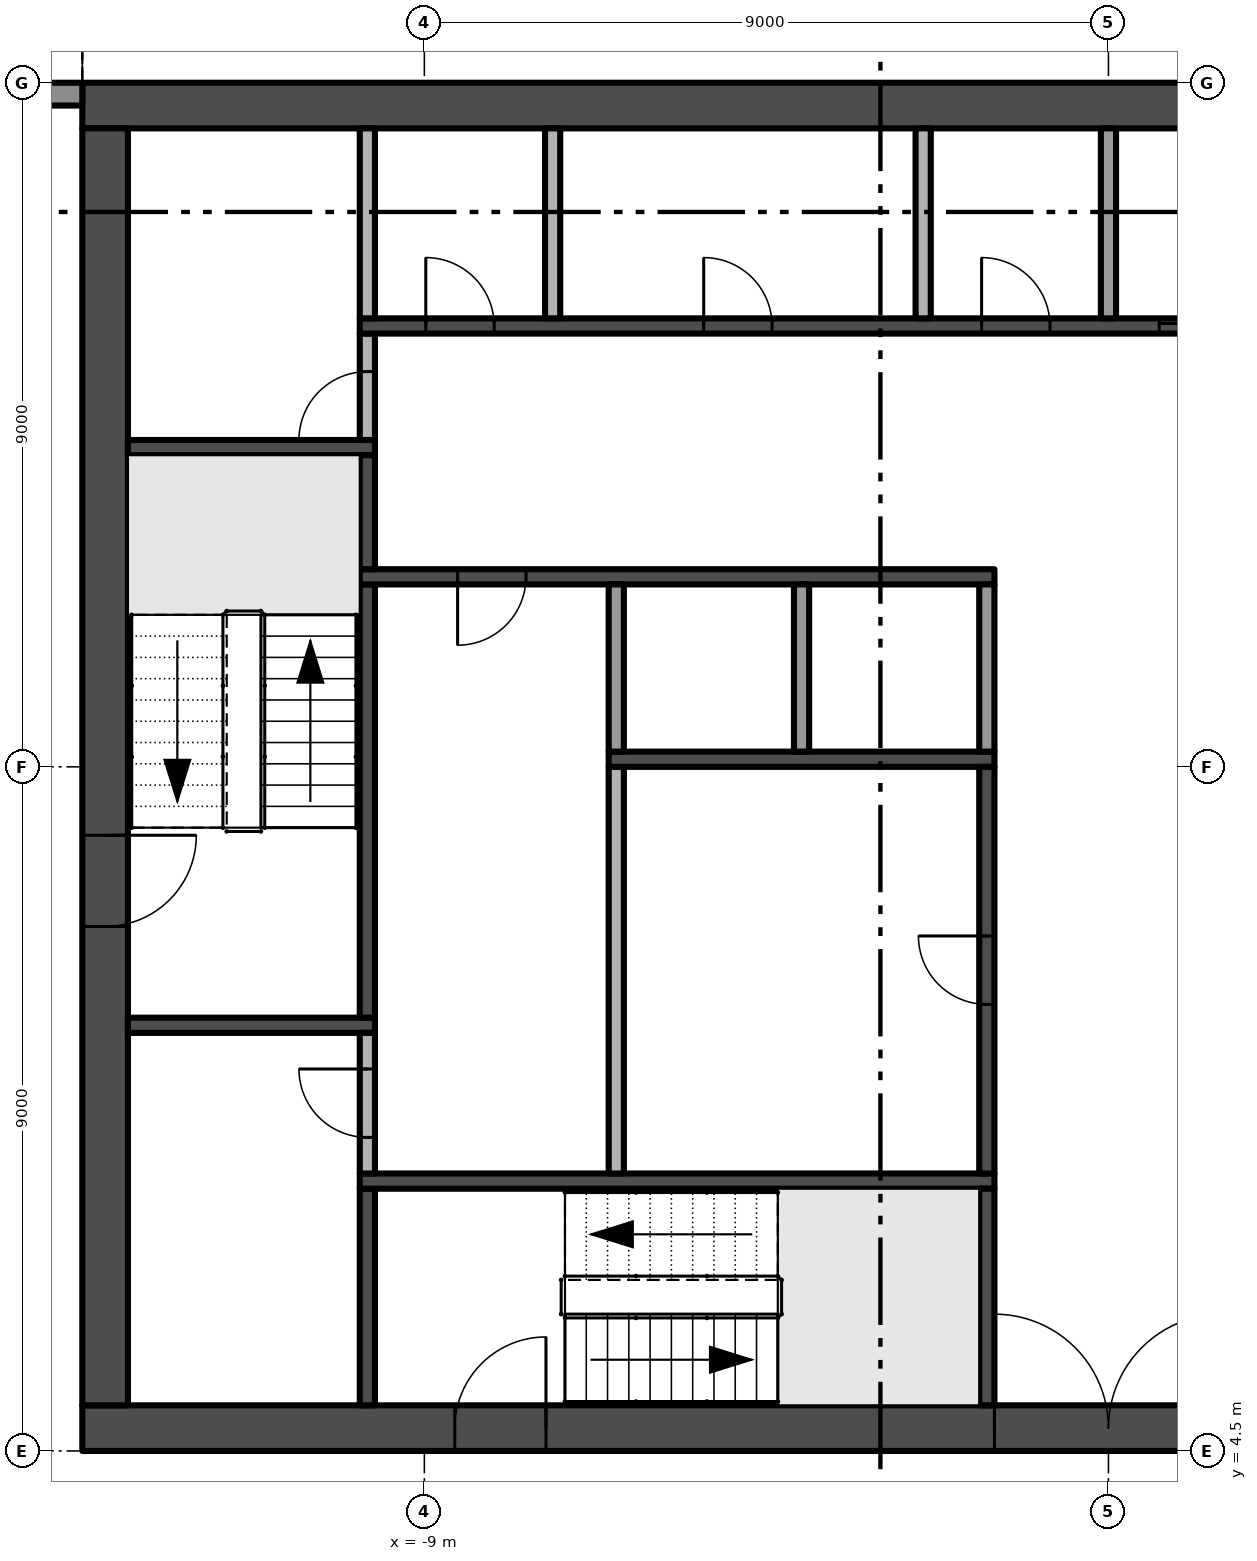
"""IFC4 building model, lengths in metres.
Left out: names, types, materials, properties, quantities, classifications, styles, units other than length and angle.
Written with IfcOpenShell. Run it as: python <this file> out.ifc"""

import sys

from ifc_helpers import new_model, si_unit, direction, frame, frame_2d, origin, place, context, subcontext, project, spatial, polyline, rectangle, outline, extrude, element, fill, save


model = new_model("IFC4")
c1 = context("Model", 3, precision=1e-05, world=origin(), true_north=direction((0.0, 1.0)))
c2 = subcontext(c1, "Body", "Model", "MODEL_VIEW")
j1 = project(units=[si_unit("LENGTHUNIT", "METRE"), si_unit("PLANEANGLEUNIT", "RADIAN")], contexts=[c1])
p1 = place(None, origin())
s1 = spatial("IfcSite", under=j1, at=p1, CompositionType="ELEMENT")
p2 = place(p1, origin())
s2 = spatial("IfcBuilding", under=s1, at=p2, CompositionType="ELEMENT")
p3 = place(p2, frame((0.0, 0.0, 226.2)))
s3 = spatial("IfcBuildingStorey", under=s2, at=p3, CompositionType="ELEMENT", Elevation=226.2)
p4 = place(p3, frame((-13.5, 4.8, -0.3), z_axis=(0.0, 0.0, 1.0), x_axis=(1.0, 0.0, 0.0)))
e1 = element("IfcWall", 1, at=p4, inside=s3, PredefinedType="SHEAR", context=c2, shape_type="SweptSolid", body=[
    extrude(rectangle(XDim=27.0, YDim=0.6, at=frame_2d((13.5, 0.0))), origin(), (0.0, 0.0, 1.0), 3.8),
])
p5 = place(p4, frame((12.0, 0.0, 0.3)))
e2 = element("IfcOpeningElement", 2, at=p5, cuts=e1, PredefinedType="OPENING", context=c2, shape_type="SweptSolid", body=[
    extrude(rectangle(XDim=3.0, YDim=2.4, at=frame_2d((1.5, 1.2))), frame((0.0, 0.31, 0.0), z_axis=(0.0, -1.0, 0.0), x_axis=(1.0, 0.0, 0.0)), (0.0, 0.0, 1.0), 0.62),
])
p6 = place(p4, frame((4.9, 0.0, 0.3)))
e3 = element("IfcOpeningElement", 3, at=p6, cuts=e1, PredefinedType="OPENING", context=c2, shape_type="SweptSolid", body=[
    extrude(rectangle(XDim=1.2, YDim=2.2, at=frame_2d((0.6, 1.1))), frame((0.0, 0.31, 0.0), z_axis=(0.0, -1.0, 0.0), x_axis=(1.0, 0.0, 0.0)), (0.0, 0.0, 1.0), 0.62),
])
p7 = place(p4, frame((20.75, 0.0, 0.3)))
e4 = element("IfcOpeningElement", 4, at=p7, cuts=e1, PredefinedType="OPENING", context=c2, shape_type="SweptSolid", body=[
    extrude(rectangle(XDim=1.5, YDim=2.2, at=frame_2d((0.75, 1.1))), frame((0.0, 0.31, 0.0), z_axis=(0.0, -1.0, 0.0), x_axis=(1.0, 0.0, 0.0)), (0.0, 0.0, 1.0), 0.62),
])
p8 = place(p4, frame((17.4, 0.0, 0.3)))
e5 = element("IfcOpeningElement", 5, at=p8, cuts=e1, PredefinedType="OPENING", context=c2, shape_type="SweptSolid", body=[
    extrude(rectangle(XDim=1.2, YDim=2.2, at=frame_2d((0.6, 1.1))), frame((0.0, 0.31, 0.0), z_axis=(0.0, -1.0, 0.0), x_axis=(1.0, 0.0, 0.0)), (0.0, 0.0, 1.0), 0.62),
])
p9 = place(p3, frame((13.5, 22.2, -0.3), z_axis=(0.0, 0.0, 1.0), x_axis=(-1.0, 0.0, 0.0)))
e6 = element("IfcWall", 6, at=p9, inside=s3, PredefinedType="SHEAR", context=c2, shape_type="SweptSolid", body=[
    extrude(rectangle(XDim=27.0, YDim=0.6, at=frame_2d((13.5, 0.0))), origin(), (0.0, 0.0, 1.0), 3.8),
])
p10 = place(p3, frame((-13.2, 21.9, -0.3), z_axis=(0.0, 0.0, 1.0), x_axis=(0.0, -1.0, 0.0)))
e7 = element("IfcWall", 7, at=p10, inside=s3, PredefinedType="SHEAR", context=c2, shape_type="SweptSolid", body=[
    extrude(rectangle(XDim=16.8, YDim=0.6, at=frame_2d((8.4, 0.0))), origin(), (0.0, 0.0, 1.0), 3.8),
])
p11 = place(p10, frame((9.3, 0.0, 0.3)))
e8 = element("IfcOpeningElement", 8, at=p11, cuts=e7, PredefinedType="OPENING", context=c2, shape_type="SweptSolid", body=[
    extrude(rectangle(XDim=1.2, YDim=2.2, at=frame_2d((0.6, 1.1))), frame((0.0, 0.31, 0.0), z_axis=(0.0, -1.0, 0.0), x_axis=(1.0, 0.0, 0.0)), (0.0, 0.0, 1.0), 0.62),
])
p12 = place(p3, frame((-17.525, 22.35, 0.0), z_axis=(0.0, 0.0, 1.0), x_axis=(1.0, 0.0, 0.0)))
e9 = element("IfcWall", 9, at=p12, inside=s3, PredefinedType="SOLIDWALL", context=c2, shape_type="SweptSolid", body=[
    extrude(rectangle(XDim=4.025, YDim=0.3, at=frame_2d((2.013, 0.0))), origin(), (0.0, 0.0, 1.0), 3.5),
])
p13 = place(p12, frame((0.325, 0.0, 0.45)))
e10 = element("IfcOpeningElement", 10, at=p13, cuts=e9, PredefinedType="OPENING", context=c2, shape_type="SweptSolid", body=[
    extrude(rectangle(XDim=3.075, YDim=2.65, at=frame_2d((1.538, 1.325))), frame((0.0, 0.16, 0.0), z_axis=(0.0, -1.0, 0.0), x_axis=(1.0, 0.0, 0.0)), (0.0, 0.0, 1.0), 0.32),
])
p14 = place(p3, origin())
e11 = element("IfcWall", 11, at=p14, inside=s3, PredefinedType="USERDEFINED", context=c2, shape_type="SweptSolid", body=[
    extrude(outline(polyline([(-13.5, 24.3), (-15.0, 23.595), (-16.5, 23.159), (-17.25, 23.1), (-18.0, 23.159), (-19.5, 23.595), (-21.0, 24.3), (-22.5, 25.005), (-22.606, 24.779), (-21.106, 24.074), (-19.589, 23.36), (-18.045, 22.911), (-17.25, 22.849), (-16.455, 22.911), (-14.911, 23.36), (-13.394, 24.074), (-13.5, 24.3)])), origin(), (0.0, 0.0, 1.0), 0.9),
])
for number, where, z_axis, x_axis in (
    (12, (-12.9, 10.1, 0.0), (0.0, 0.0, 1.0), (1.0, 0.0, 0.0)),
    (13, (-12.9, 17.7, 0.0), (0.0, 0.0, 1.0), (1.0, 0.0, 0.0)),
):
    element("IfcWall", number, at=place(p3, frame(where, z_axis=z_axis, x_axis=x_axis)), inside=s3, PredefinedType="SHEAR", context=c2, shape_type="SweptSolid", body=[
        extrude(rectangle(XDim=3.25, YDim=0.2, at=frame_2d((1.625, 0.0))), origin(), (0.0, 0.0, 1.0), 3.5),
    ])
p15 = place(p3, frame((-9.75, 5.1, 0.0), z_axis=(0.0, 0.0, 1.0), x_axis=(0.0, 1.0, 0.0)))
e14 = element("IfcWall", 14, at=p15, inside=s3, PredefinedType="SHEAR", context=c2, shape_type="SweptSolid", body=[
    extrude(rectangle(XDim=2.85, YDim=0.2, at=frame_2d((1.425, 0.0))), origin(), (0.0, 0.0, 1.0), 3.5),
])
p16 = place(p3, frame((-9.85, 8.05, 0.0), z_axis=(0.0, 0.0, 1.0), x_axis=(1.0, 0.0, 0.0)))
e15 = element("IfcWall", 15, at=p16, inside=s3, PredefinedType="SHEAR", context=c2, shape_type="SweptSolid", body=[
    extrude(rectangle(XDim=8.35, YDim=0.2, at=frame_2d((4.175, 0.0))), origin(), (0.0, 0.0, 1.0), 3.5),
])
p17 = place(p3, frame((-9.75, 8.15, 0.0), z_axis=(0.0, 0.0, 1.0), x_axis=(0.0, 1.0, 0.0)))
e16 = element("IfcWall", 16, at=p17, inside=s3, PredefinedType="PARTITIONING", context=c2, shape_type="SweptSolid", body=[
    extrude(rectangle(XDim=1.85, YDim=0.2, at=frame_2d((0.925, 0.0))), origin(), (0.0, 0.0, 1.0), 3.5),
])
p18 = place(p17, frame((0.475, 0.0, 0.0)))
e17 = element("IfcOpeningElement", 17, at=p18, cuts=e16, PredefinedType="OPENING", context=c2, shape_type="SweptSolid", body=[
    extrude(rectangle(XDim=0.9, YDim=2.1, at=frame_2d((0.45, 1.05))), frame((0.0, 0.11, 0.0), z_axis=(0.0, -1.0, 0.0), x_axis=(1.0, 0.0, 0.0)), (0.0, 0.0, 1.0), 0.22),
])
p19 = place(p3, frame((-9.75, 10.2, 0.0), z_axis=(0.0, 0.0, 1.0), x_axis=(0.0, 1.0, 0.0)))
e18 = element("IfcWall", 18, at=p19, inside=s3, PredefinedType="SHEAR", context=c2, shape_type="SweptSolid", body=[
    extrude(rectangle(XDim=5.7, YDim=0.2, at=frame_2d((2.85, 0.0))), origin(), (0.0, 0.0, 1.0), 3.5),
])
p20 = place(p3, frame((-1.5, 16.0, 0.0), z_axis=(0.0, 0.0, 1.0), x_axis=(-1.0, 0.0, 0.0)))
e19 = element("IfcWall", 19, at=p20, inside=s3, PredefinedType="SHEAR", context=c2, shape_type="SweptSolid", body=[
    extrude(rectangle(XDim=8.35, YDim=0.2, at=frame_2d((4.175, 0.0))), origin(), (0.0, 0.0, 1.0), 3.5),
])
p21 = place(p20, frame((6.162, 0.0, 0.0)))
e20 = element("IfcOpeningElement", 20, at=p21, cuts=e19, PredefinedType="OPENING", context=c2, shape_type="SweptSolid", body=[
    extrude(rectangle(XDim=0.9, YDim=2.1, at=frame_2d((0.45, 1.05))), frame((0.0, 0.11, 0.0), z_axis=(0.0, -1.0, 0.0), x_axis=(1.0, 0.0, 0.0)), (0.0, 0.0, 1.0), 0.22),
])
p22 = place(p3, frame((-9.75, 16.1, 0.0), z_axis=(0.0, 0.0, 1.0), x_axis=(0.0, 1.0, 0.0)))
e21 = element("IfcWall", 21, at=p22, inside=s3, PredefinedType="SHEAR", context=c2, shape_type="SweptSolid", body=[
    extrude(rectangle(XDim=1.5, YDim=0.2, at=frame_2d((0.75, 0.0))), origin(), (0.0, 0.0, 1.0), 3.5),
])
p23 = place(p3, frame((-9.75, 17.8, 0.0), z_axis=(0.0, 0.0, 1.0), x_axis=(0.0, 1.0, 0.0)))
e22 = element("IfcWall", 22, at=p23, inside=s3, PredefinedType="PARTITIONING", context=c2, shape_type="SweptSolid", body=[
    extrude(rectangle(XDim=1.4, YDim=0.2, at=frame_2d((0.7, 0.0))), origin(), (0.0, 0.0, 1.0), 3.5),
])
p24 = place(p23, origin())
e23 = element("IfcOpeningElement", 23, at=p24, cuts=e22, PredefinedType="OPENING", context=c2, shape_type="SweptSolid", body=[
    extrude(rectangle(XDim=0.9, YDim=2.1, at=frame_2d((0.45, 1.05))), frame((0.0, 0.11, 0.0), z_axis=(0.0, -1.0, 0.0), x_axis=(1.0, 0.0, 0.0)), (0.0, 0.0, 1.0), 0.22),
])
p25 = place(p3, frame((-9.85, 19.3, 0.0), z_axis=(0.0, 0.0, 1.0), x_axis=(1.0, 0.0, 0.0)))
e24 = element("IfcWall", 24, at=p25, inside=s3, PredefinedType="SHEAR", context=c2, shape_type="SweptSolid", body=[
    extrude(rectangle(XDim=19.7, YDim=0.2, at=frame_2d((9.85, 0.0))), origin(), (0.0, 0.0, 1.0), 3.5),
])
p26 = place(p25, frame((10.519, 0.0, 0.0)))
e25 = element("IfcOpeningElement", 25, at=p26, cuts=e24, PredefinedType="OPENING", context=c2, shape_type="SweptSolid", body=[
    extrude(rectangle(XDim=1.1, YDim=2.1, at=frame_2d((0.55, 1.05))), frame((0.0, 0.11, 0.0), z_axis=(0.0, -1.0, 0.0), x_axis=(1.0, 0.0, 0.0)), (0.0, 0.0, 1.0), 0.22),
])
p27 = place(p25, frame((12.956, 0.0, 0.0)))
e26 = element("IfcOpeningElement", 26, at=p27, cuts=e24, PredefinedType="OPENING", context=c2, shape_type="SweptSolid", body=[
    extrude(rectangle(XDim=1.1, YDim=2.1, at=frame_2d((0.55, 1.05))), frame((0.0, 0.11, 0.0), z_axis=(0.0, -1.0, 0.0), x_axis=(1.0, 0.0, 0.0)), (0.0, 0.0, 1.0), 0.22),
])
p28 = place(p25, frame((15.394, 0.0, 0.0)))
e27 = element("IfcOpeningElement", 27, at=p28, cuts=e24, PredefinedType="OPENING", context=c2, shape_type="SweptSolid", body=[
    extrude(rectangle(XDim=1.1, YDim=2.1, at=frame_2d((0.55, 1.05))), frame((0.0, 0.11, 0.0), z_axis=(0.0, -1.0, 0.0), x_axis=(1.0, 0.0, 0.0)), (0.0, 0.0, 1.0), 0.22),
])
p29 = place(p25, frame((17.831, 0.0, 0.0)))
e28 = element("IfcOpeningElement", 28, at=p29, cuts=e24, PredefinedType="OPENING", context=c2, shape_type="SweptSolid", body=[
    extrude(rectangle(XDim=1.1, YDim=2.1, at=frame_2d((0.55, 1.05))), frame((0.0, 0.11, 0.0), z_axis=(0.0, -1.0, 0.0), x_axis=(1.0, 0.0, 0.0)), (0.0, 0.0, 1.0), 0.22),
])
p30 = place(p25, frame((0.869, 0.0, 0.0)))
e29 = element("IfcOpeningElement", 29, at=p30, cuts=e24, PredefinedType="OPENING", context=c2, shape_type="SweptSolid", body=[
    extrude(rectangle(XDim=0.9, YDim=2.1, at=frame_2d((0.45, 1.05))), frame((0.0, 0.11, 0.0), z_axis=(0.0, -1.0, 0.0), x_axis=(1.0, 0.0, 0.0)), (0.0, 0.0, 1.0), 0.22),
])
p31 = place(p25, frame((4.525, 0.0, 0.0)))
e30 = element("IfcOpeningElement", 30, at=p31, cuts=e24, PredefinedType="OPENING", context=c2, shape_type="SweptSolid", body=[
    extrude(rectangle(XDim=0.9, YDim=2.1, at=frame_2d((0.45, 1.05))), frame((0.0, 0.11, 0.0), z_axis=(0.0, -1.0, 0.0), x_axis=(1.0, 0.0, 0.0)), (0.0, 0.0, 1.0), 0.22),
])
p32 = place(p25, frame((8.181, 0.0, 0.0)))
e31 = element("IfcOpeningElement", 31, at=p32, cuts=e24, PredefinedType="OPENING", context=c2, shape_type="SweptSolid", body=[
    extrude(rectangle(XDim=0.9, YDim=2.1, at=frame_2d((0.45, 1.05))), frame((0.0, 0.11, 0.0), z_axis=(0.0, -1.0, 0.0), x_axis=(1.0, 0.0, 0.0)), (0.0, 0.0, 1.0), 0.22),
])
for number, where, z_axis, x_axis in (
    (32, (-9.75, 19.4, 0.0), (0.0, 0.0, 1.0), (0.0, 1.0, 0.0)),
    (33, (-7.312, 19.4, 0.0), (0.0, 0.0, 1.0), (0.0, 1.0, 0.0)),
):
    element("IfcWall", number, at=place(p3, frame(where, z_axis=z_axis, x_axis=x_axis)), inside=s3, PredefinedType="PARTITIONING", context=c2, shape_type="SweptSolid", body=[
        extrude(rectangle(XDim=2.5, YDim=0.2, at=frame_2d((1.25, 0.0))), origin(), (0.0, 0.0, 1.0), 3.5),
    ])
p33 = place(p3, frame((-6.475, 8.15, 0.0), z_axis=(0.0, 0.0, 1.0), x_axis=(0.0, 1.0, 0.0)))
e34 = element("IfcWall", 34, at=p33, inside=s3, PredefinedType="PARTITIONING", context=c2, shape_type="SweptSolid", body=[
    extrude(rectangle(XDim=5.35, YDim=0.2, at=frame_2d((2.675, 0.0))), origin(), (0.0, 0.0, 1.0), 3.5),
])
p34 = place(p3, frame((-6.575, 13.6, 0.0), z_axis=(0.0, 0.0, 1.0), x_axis=(1.0, 0.0, 0.0)))
e35 = element("IfcWall", 35, at=p34, inside=s3, PredefinedType="SHEAR", context=c2, shape_type="SweptSolid", body=[
    extrude(rectangle(XDim=5.075, YDim=0.2, at=frame_2d((2.538, 0.0))), origin(), (0.0, 0.0, 1.0), 3.5),
])
for number, where, z_axis, x_axis in (
    (36, (-6.475, 13.7, 0.0), (0.0, 0.0, 1.0), (0.0, 1.0, 0.0)),
    (37, (-4.037, 13.7, 0.0), (0.0, 0.0, 1.0), (0.0, 1.0, 0.0)),
):
    element("IfcWall", number, at=place(p3, frame(where, z_axis=z_axis, x_axis=x_axis)), inside=s3, PredefinedType="PARTITIONING", context=c2, shape_type="SweptSolid", body=[
        extrude(rectangle(XDim=2.2, YDim=0.2, at=frame_2d((1.1, 0.0))), origin(), (0.0, 0.0, 1.0), 3.5),
    ])
p35 = place(p3, frame((-2.438, 19.4, 0.0), z_axis=(0.0, 0.0, 1.0), x_axis=(0.0, 1.0, 0.0)))
e38 = element("IfcWall", 38, at=p35, inside=s3, PredefinedType="PARTITIONING", context=c2, shape_type="SweptSolid", body=[
    extrude(rectangle(XDim=2.5, YDim=0.2, at=frame_2d((1.25, 0.0))), origin(), (0.0, 0.0, 1.0), 3.5),
])
p36 = place(p3, frame((-1.6, 5.1, 0.0), z_axis=(0.0, 0.0, 1.0), x_axis=(0.0, 1.0, 0.0)))
e39 = element("IfcWall", 39, at=p36, inside=s3, PredefinedType="SHEAR", context=c2, shape_type="SweptSolid", body=[
    extrude(rectangle(XDim=2.85, YDim=0.2, at=frame_2d((1.425, 0.0))), origin(), (0.0, 0.0, 1.0), 3.5),
])
p37 = place(p3, frame((-1.6, 8.15, 0.0), z_axis=(0.0, 0.0, 1.0), x_axis=(0.0, 1.0, 0.0)))
e40 = element("IfcWall", 40, at=p37, inside=s3, PredefinedType="SHEAR", context=c2, shape_type="SweptSolid", body=[
    extrude(rectangle(XDim=5.35, YDim=0.2, at=frame_2d((2.675, 0.0))), origin(), (0.0, 0.0, 1.0), 3.5),
])
p38 = place(p37, frame((2.225, 0.0, 0.0)))
e41 = element("IfcOpeningElement", 41, at=p38, cuts=e40, PredefinedType="OPENING", context=c2, shape_type="SweptSolid", body=[
    extrude(rectangle(XDim=0.9, YDim=2.1, at=frame_2d((0.45, 1.05))), frame((0.0, 0.11, 0.0), z_axis=(0.0, -1.0, 0.0), x_axis=(1.0, 0.0, 0.0)), (0.0, 0.0, 1.0), 0.22),
])
p39 = place(p3, frame((-1.6, 13.7, 0.0), z_axis=(0.0, 0.0, 1.0), x_axis=(0.0, 1.0, 0.0)))
e42 = element("IfcWall", 42, at=p39, inside=s3, PredefinedType="PARTITIONING", context=c2, shape_type="SweptSolid", body=[
    extrude(rectangle(XDim=2.2, YDim=0.2, at=frame_2d((1.1, 0.0))), origin(), (0.0, 0.0, 1.0), 3.5),
])
p40 = place(p3, frame((0.0, 19.4, 0.0), z_axis=(0.0, 0.0, 1.0), x_axis=(0.0, 1.0, 0.0)))
e43 = element("IfcWall", 43, at=p40, inside=s3, PredefinedType="PARTITIONING", context=c2, shape_type="SweptSolid", body=[
    extrude(rectangle(XDim=2.5, YDim=0.2, at=frame_2d((1.25, 0.0))), origin(), (0.0, 0.0, 1.0), 3.5),
])
p41 = place(p5, frame((3.0, 0.0, 0.0), z_axis=(0.0, 0.0, 1.0), x_axis=(-1.0, 0.0, 0.0)))
e44 = element("IfcDoor", 44, at=p41, inside=s3, OperationType="DOUBLE_DOOR_SINGLE_SWING", PredefinedType="DOOR", context=c2, shape_type="SweptSolid", body=[
    extrude(rectangle(XDim=3.0, YDim=2.4, at=frame_2d((1.5, 1.2))), frame((0.0, 0.025, 0.0), z_axis=(0.0, -1.0, 0.0), x_axis=(1.0, 0.0, 0.0)), (0.0, 0.0, 1.0), 0.05),
])
fill(e2, e44)
p42 = place(p11, frame((1.2, 0.0, 0.0), z_axis=(0.0, 0.0, 1.0), x_axis=(-1.0, 0.0, 0.0)))
e45 = element("IfcDoor", 45, at=p42, inside=s3, OperationType="SINGLE_SWING_RIGHT", PredefinedType="DOOR", context=c2, shape_type="SweptSolid", body=[
    extrude(rectangle(XDim=1.2, YDim=2.2, at=frame_2d((0.6, 1.1))), frame((0.0, 0.025, 0.0), z_axis=(0.0, -1.0, 0.0), x_axis=(1.0, 0.0, 0.0)), (0.0, 0.0, 1.0), 0.05),
])
fill(e8, e45)
p43 = place(p6, frame((1.2, 0.0, 0.0), z_axis=(0.0, 0.0, 1.0), x_axis=(-1.0, 0.0, 0.0)))
e46 = element("IfcDoor", 46, at=p43, inside=s3, OperationType="SINGLE_SWING_LEFT", PredefinedType="DOOR", context=c2, shape_type="SweptSolid", body=[
    extrude(rectangle(XDim=1.2, YDim=2.2, at=frame_2d((0.6, 1.1))), frame((0.0, 0.025, 0.0), z_axis=(0.0, -1.0, 0.0), x_axis=(1.0, 0.0, 0.0)), (0.0, 0.0, 1.0), 0.05),
])
fill(e3, e46)
p44 = place(p26, origin())
e47 = element("IfcDoor", 47, at=p44, inside=s3, OperationType="SLIDING_TO_RIGHT", PredefinedType="DOOR", context=c2, shape_type="SweptSolid", body=[
    extrude(rectangle(XDim=1.1, YDim=2.1, at=frame_2d((0.55, 1.05))), frame((0.0, 0.025, 0.0), z_axis=(0.0, -1.0, 0.0), x_axis=(1.0, 0.0, 0.0)), (0.0, 0.0, 1.0), 0.05),
])
fill(e25, e47)
p45 = place(p21, origin())
e48 = element("IfcDoor", 48, at=p45, inside=s3, OperationType="SINGLE_SWING_RIGHT", PredefinedType="DOOR", context=c2, shape_type="SweptSolid", body=[
    extrude(rectangle(XDim=0.9, YDim=2.1, at=frame_2d((0.45, 1.05))), frame((0.0, 0.025, 0.0), z_axis=(0.0, -1.0, 0.0), x_axis=(1.0, 0.0, 0.0)), (0.0, 0.0, 1.0), 0.05),
])
fill(e20, e48)
p46 = place(p38, origin())
e49 = element("IfcDoor", 49, at=p46, inside=s3, OperationType="SINGLE_SWING_RIGHT", PredefinedType="DOOR", context=c2, shape_type="SweptSolid", body=[
    extrude(rectangle(XDim=0.9, YDim=2.1, at=frame_2d((0.45, 1.05))), frame((0.0, 0.025, 0.0), z_axis=(0.0, -1.0, 0.0), x_axis=(1.0, 0.0, 0.0)), (0.0, 0.0, 1.0), 0.05),
])
fill(e41, e49)
p47 = place(p24, origin())
e50 = element("IfcDoor", 50, at=p47, inside=s3, OperationType="SINGLE_SWING_LEFT", PredefinedType="DOOR", context=c2, shape_type="SweptSolid", body=[
    extrude(rectangle(XDim=0.9, YDim=2.1, at=frame_2d((0.45, 1.05))), frame((0.0, 0.025, 0.0), z_axis=(0.0, -1.0, 0.0), x_axis=(1.0, 0.0, 0.0)), (0.0, 0.0, 1.0), 0.05),
])
fill(e23, e50)
p48 = place(p30, origin())
e51 = element("IfcDoor", 51, at=p48, inside=s3, OperationType="SINGLE_SWING_LEFT", PredefinedType="DOOR", context=c2, shape_type="SweptSolid", body=[
    extrude(rectangle(XDim=0.9, YDim=2.1, at=frame_2d((0.45, 1.05))), frame((0.0, 0.025, 0.0), z_axis=(0.0, -1.0, 0.0), x_axis=(1.0, 0.0, 0.0)), (0.0, 0.0, 1.0), 0.05),
])
fill(e29, e51)
p49 = place(p31, origin())
e52 = element("IfcDoor", 52, at=p49, inside=s3, OperationType="SINGLE_SWING_LEFT", PredefinedType="DOOR", context=c2, shape_type="SweptSolid", body=[
    extrude(rectangle(XDim=0.9, YDim=2.1, at=frame_2d((0.45, 1.05))), frame((0.0, 0.025, 0.0), z_axis=(0.0, -1.0, 0.0), x_axis=(1.0, 0.0, 0.0)), (0.0, 0.0, 1.0), 0.05),
])
fill(e30, e52)
p50 = place(p32, origin())
e53 = element("IfcDoor", 53, at=p50, inside=s3, OperationType="SINGLE_SWING_LEFT", PredefinedType="DOOR", context=c2, shape_type="SweptSolid", body=[
    extrude(rectangle(XDim=0.9, YDim=2.1, at=frame_2d((0.45, 1.05))), frame((0.0, 0.025, 0.0), z_axis=(0.0, -1.0, 0.0), x_axis=(1.0, 0.0, 0.0)), (0.0, 0.0, 1.0), 0.05),
])
fill(e31, e53)
p51 = place(p18, origin())
e54 = element("IfcDoor", 54, at=p51, inside=s3, OperationType="SINGLE_SWING_RIGHT", PredefinedType="DOOR", context=c2, shape_type="SweptSolid", body=[
    extrude(rectangle(XDim=0.9, YDim=2.1, at=frame_2d((0.45, 1.05))), frame((0.0, 0.025, 0.0), z_axis=(0.0, -1.0, 0.0), x_axis=(1.0, 0.0, 0.0)), (0.0, 0.0, 1.0), 0.05),
])
fill(e17, e54)
save(model, sys.argv[1])
